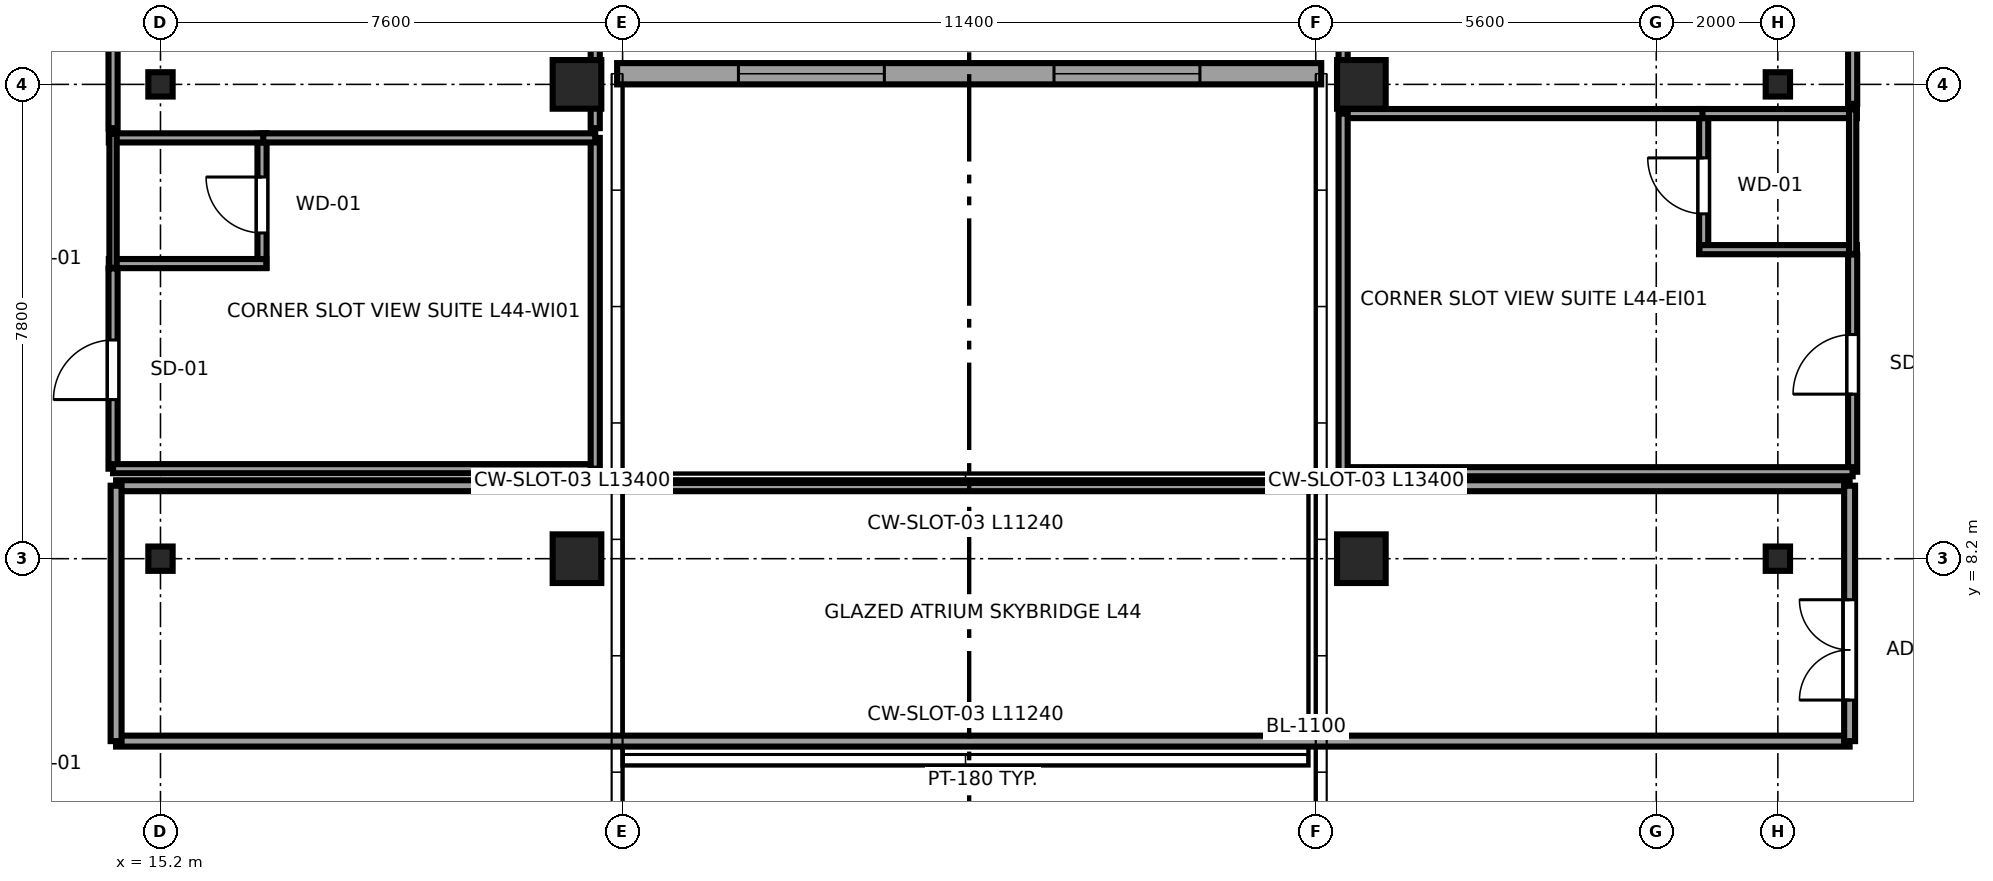
"""IFC4 building model, lengths in metres.
Left out: names, types, materials, properties, quantities, classifications, styles, units other than length and angle.
Written with IfcOpenShell. Run it as: python <this file> out.ifc"""

import sys

from ifc_helpers import new_model, si_unit, direction, frame, frame_2d, origin, origin_2d, place, context, subcontext, project, spatial, rectangle, i_section, extrude, source, transform, mapped, element, fill, save


model = new_model("IFC4")
c1 = context("Model", 3, precision=1e-05, world=origin(), true_north=direction((0.0, 1.0)))
c2 = subcontext(c1, "Body", "Model", "MODEL_VIEW")
j1 = project(units=[si_unit("LENGTHUNIT", "METRE"), si_unit("PLANEANGLEUNIT", "RADIAN")], contexts=[c1])
p1 = place(None, origin())
s1 = spatial("IfcSite", under=j1, at=p1, CompositionType="ELEMENT")
p2 = place(p1, origin())
s2 = spatial("IfcBuilding", under=s1, at=p2, CompositionType="ELEMENT")
p3 = place(p2, frame((0.0, 0.0, 168.35)))
s3 = spatial("IfcBuildingStorey", under=s2, at=p3, CompositionType="ELEMENT", Elevation=168.35)
m1 = source(origin(), c2, "Body", "SweptSolid", [
    extrude(i_section(OverallWidth=0.4, OverallDepth=0.4, WebThickness=0.02, FlangeThickness=0.035, at=origin_2d()), origin(), (0.0, 0.0, 1.0), 3.55),
])
for number, where, z_axis, x_axis in (
    (1, (15.2, 8.2, 0.0), (0.0, 0.0, 1.0), (1.0, 0.0, 0.0)),
    (2, (15.2, 16.0, 0.0), (0.0, 0.0, 1.0), (1.0, 0.0, 0.0)),
):
    element("IfcColumn", number, at=place(p3, frame(where, z_axis=z_axis, x_axis=x_axis)), inside=s3, PredefinedType="COLUMN", context=c2, shape_type="MappedRepresentation", body=[
        mapped(m1, transform((0.0, 0.0, 0.0), x_axis=(1.0, 0.0, 0.0), y_axis=(0.0, 1.0, 0.0), z_axis=(0.0, 0.0, 1.0), scale=1.0)),
    ])
m2 = source(origin(), c2, "Body", "SweptSolid", [
    extrude(rectangle(XDim=0.8, YDim=0.8, at=origin_2d()), origin(), (0.0, 0.0, 1.0), 3.55),
])
for number, where, z_axis, x_axis in (
    (3, (22.05, 8.2, 0.0), (0.0, 0.0, 1.0), (1.0, 0.0, 0.0)),
    (4, (22.05, 16.0, 0.0), (0.0, 0.0, 1.0), (1.0, 0.0, 0.0)),
    (5, (34.95, 8.2, 0.0), (0.0, 0.0, 1.0), (1.0, 0.0, 0.0)),
    (6, (34.95, 16.0, 0.0), (0.0, 0.0, 1.0), (1.0, 0.0, 0.0)),
):
    element("IfcColumn", number, at=place(p3, frame(where, z_axis=z_axis, x_axis=x_axis)), inside=s3, PredefinedType="COLUMN", context=c2, shape_type="MappedRepresentation", body=[
        mapped(m2, transform((0.0, 0.0, 0.0), x_axis=(1.0, 0.0, 0.0), y_axis=(0.0, 1.0, 0.0), z_axis=(0.0, 0.0, 1.0), scale=1.0)),
    ])
for number, where, z_axis, x_axis in (
    (7, (41.8, 8.2, 0.0), (0.0, 0.0, 1.0), (1.0, 0.0, 0.0)),
    (8, (41.8, 16.0, 0.0), (0.0, 0.0, 1.0), (1.0, 0.0, 0.0)),
):
    element("IfcColumn", number, at=place(p3, frame(where, z_axis=z_axis, x_axis=x_axis)), inside=s3, PredefinedType="COLUMN", context=c2, shape_type="MappedRepresentation", body=[
        mapped(m1, transform((0.0, 0.0, 0.0), x_axis=(1.0, 0.0, 0.0), y_axis=(0.0, 1.0, 0.0), z_axis=(0.0, 0.0, 1.0), scale=1.0)),
    ])
p4 = place(p3, frame((22.71, 16.175, 0.0), z_axis=(0.0, 0.0, 1.0), x_axis=(1.0, 0.0, 0.0)))
e9 = element("IfcWall", 9, at=p4, inside=s3, PredefinedType="SOLIDWALL", context=c2, shape_type="SweptSolid", body=[
    extrude(rectangle(XDim=11.58, YDim=0.35, at=frame_2d((5.79, 0.0))), origin(), (0.0, 0.0, 1.0), 2.758),
])
p5 = place(p4, frame((1.995, 0.0, 0.68)))
e10 = element("IfcOpeningElement", 10, at=p5, cuts=e9, PredefinedType="OPENING", context=c2, shape_type="SweptSolid", body=[
    extrude(rectangle(XDim=2.4, YDim=1.9, at=frame_2d((1.2, 0.95))), frame((0.0, 0.185, 0.0), z_axis=(0.0, -1.0, 0.0), x_axis=(1.0, 0.0, 0.0)), (0.0, 0.0, 1.0), 0.37),
])
p6 = place(p4, frame((7.185, 0.0, 0.68)))
e11 = element("IfcOpeningElement", 11, at=p6, cuts=e9, PredefinedType="OPENING", context=c2, shape_type="SweptSolid", body=[
    extrude(rectangle(XDim=2.4, YDim=1.9, at=frame_2d((1.2, 0.95))), frame((0.0, 0.185, 0.0), z_axis=(0.0, -1.0, 0.0), x_axis=(1.0, 0.0, 0.0)), (0.0, 0.0, 1.0), 0.37),
])
p7 = place(p3, frame((16.87, 12.983, 0.0), z_axis=(0.0, 0.0, 1.0), x_axis=(0.0, 1.0, 0.0)))
e12 = element("IfcWall", 12, at=p7, inside=s3, PredefinedType="PARTITIONING", context=c2, shape_type="SweptSolid", body=[
    extrude(rectangle(XDim=2.207, YDim=0.15, at=frame_2d((1.104, 0.0))), origin(), (0.0, 0.0, 1.0), 3.37),
])
p8 = place(p7, frame((0.573, 0.0, 0.0)))
e13 = element("IfcOpeningElement", 13, at=p8, cuts=e12, PredefinedType="OPENING", context=c2, shape_type="SweptSolid", body=[
    extrude(rectangle(XDim=0.92, YDim=2.01, at=frame_2d((0.46, 1.005))), frame((0.0, 0.085, 0.0), z_axis=(0.0, -1.0, 0.0), x_axis=(1.0, 0.0, 0.0)), (0.0, 0.0, 1.0), 0.17),
])
for number, where, z_axis, x_axis in (
    (14, (14.35, 13.053, 0.0), (0.0, 0.0, 1.0), (1.0, 0.0, 0.0)),
    (15, (14.35, 15.12, 0.0), (0.0, 0.0, 1.0), (1.0, 0.0, 0.0)),
):
    element("IfcWall", number, at=place(p3, frame(where, z_axis=z_axis, x_axis=x_axis)), inside=s3, PredefinedType="PARTITIONING", context=c2, shape_type="SweptSolid", body=[
        extrude(rectangle(XDim=2.59, YDim=0.15, at=frame_2d((1.295, 0.0))), origin(), (0.0, 0.0, 1.0), 3.37),
    ])
p9 = place(p3, frame((14.42, 12.983, 0.0), z_axis=(0.0, 0.0, 1.0), x_axis=(0.0, 1.0, 0.0)))
e16 = element("IfcWall", 16, at=p9, inside=s3, PredefinedType="PLUMBINGWALL", context=c2, shape_type="SweptSolid", body=[
    extrude(rectangle(XDim=2.207, YDim=0.12, at=frame_2d((1.104, 0.0))), origin(), (0.0, 0.0, 1.0), 3.37),
])
p10 = place(p3, frame((40.58, 13.212, 0.0), z_axis=(0.0, 0.0, 1.0), x_axis=(0.0, 1.0, 0.0)))
e17 = element("IfcWall", 17, at=p10, inside=s3, PredefinedType="PARTITIONING", context=c2, shape_type="SweptSolid", body=[
    extrude(rectangle(XDim=2.378, YDim=0.15, at=frame_2d((1.189, 0.0))), origin(), (0.0, 0.0, 1.0), 3.37),
])
p11 = place(p10, frame((0.659, 0.0, 0.0)))
e18 = element("IfcOpeningElement", 18, at=p11, cuts=e17, PredefinedType="OPENING", context=c2, shape_type="SweptSolid", body=[
    extrude(rectangle(XDim=0.92, YDim=2.01, at=frame_2d((0.46, 1.005))), frame((0.0, 0.085, 0.0), z_axis=(0.0, -1.0, 0.0), x_axis=(1.0, 0.0, 0.0)), (0.0, 0.0, 1.0), 0.17),
])
for number, where, z_axis, x_axis in (
    (19, (40.51, 13.282, 0.0), (0.0, 0.0, 1.0), (1.0, 0.0, 0.0)),
    (20, (40.51, 15.52, 0.0), (0.0, 0.0, 1.0), (1.0, 0.0, 0.0)),
):
    element("IfcWall", number, at=place(p3, frame(where, z_axis=z_axis, x_axis=x_axis)), inside=s3, PredefinedType="PARTITIONING", context=c2, shape_type="SweptSolid", body=[
        extrude(rectangle(XDim=2.59, YDim=0.15, at=frame_2d((1.295, 0.0))), origin(), (0.0, 0.0, 1.0), 3.37),
    ])
p12 = place(p3, frame((43.03, 13.212, 0.0), z_axis=(0.0, 0.0, 1.0), x_axis=(0.0, 1.0, 0.0)))
e21 = element("IfcWall", 21, at=p12, inside=s3, PredefinedType="PLUMBINGWALL", context=c2, shape_type="SweptSolid", body=[
    extrude(rectangle(XDim=2.378, YDim=0.12, at=frame_2d((1.189, 0.0))), origin(), (0.0, 0.0, 1.0), 3.37),
])
p13 = place(p3, frame((14.42, 9.68, 0.0), z_axis=(0.0, 0.0, 1.0), x_axis=(0.0, 1.0, 0.0)))
e22 = element("IfcWall", 22, at=p13, inside=s3, PredefinedType="PARTITIONING", context=c2, shape_type="SweptSolid", body=[
    extrude(rectangle(XDim=3.293, YDim=0.15, at=frame_2d((1.646, 0.0))), origin(), (0.0, 0.0, 1.0), 3.37),
])
p14 = place(p13, frame((1.136, 0.0, 0.0)))
e23 = element("IfcOpeningElement", 23, at=p14, cuts=e22, PredefinedType="OPENING", context=c2, shape_type="SweptSolid", body=[
    extrude(rectangle(XDim=0.98, YDim=2.12, at=frame_2d((0.49, 1.06))), frame((0.0, 0.085, 0.0), z_axis=(0.0, -1.0, 0.0), x_axis=(1.0, 0.0, 0.0)), (0.0, 0.0, 1.0), 0.17),
])
p15 = place(p3, frame((14.42, 9.68, 0.0), z_axis=(0.0, 0.0, 1.0), x_axis=(1.0, 0.0, 0.0)))
e24 = element("IfcWall", 24, at=p15, inside=s3, PredefinedType="PARTITIONING", context=c2, shape_type="SweptSolid", body=[
    extrude(rectangle(XDim=7.93, YDim=0.15, at=frame_2d((3.965, 0.0))), origin(), (0.0, 0.0, 1.0), 2.748),
])
p16 = place(p3, frame((22.35, 9.68, 0.0), z_axis=(0.0, 0.0, 1.0), x_axis=(0.0, 1.0, 0.0)))
e25 = element("IfcWall", 25, at=p16, inside=s3, PredefinedType="PARTITIONING", context=c2, shape_type="SweptSolid", body=[
    extrude(rectangle(XDim=5.44, YDim=0.15, at=frame_2d((2.72, 0.0))), origin(), (0.0, 0.0, 1.0), 3.37),
])
p17 = place(p3, frame((16.89, 15.12, 0.0), z_axis=(0.0, 0.0, 1.0), x_axis=(1.0, 0.0, 0.0)))
e26 = element("IfcWall", 26, at=p17, inside=s3, PredefinedType="PARTITIONING", context=c2, shape_type="SweptSolid", body=[
    extrude(rectangle(XDim=5.46, YDim=0.15, at=frame_2d((2.73, 0.0))), origin(), (0.0, 0.0, 1.0), 3.37),
])
p18 = place(p3, frame((14.42, 15.28, 0.0), z_axis=(0.0, 0.0, 1.0), x_axis=(0.0, 1.0, 0.0)))
e27 = element("IfcWall", 27, at=p18, inside=s3, PredefinedType="PARTITIONING", context=c2, shape_type="SweptSolid", body=[
    extrude(rectangle(XDim=3.355, YDim=0.15, at=frame_2d((1.677, 0.0))), origin(), (0.0, 0.0, 1.0), 3.37),
])
p19 = place(p18, frame((2.065, 0.0, 0.0)))
e28 = element("IfcOpeningElement", 28, at=p19, cuts=e27, PredefinedType="OPENING", context=c2, shape_type="SweptSolid", body=[
    extrude(rectangle(XDim=0.98, YDim=2.12, at=frame_2d((0.49, 1.06))), frame((0.0, 0.085, 0.0), z_axis=(0.0, -1.0, 0.0), x_axis=(1.0, 0.0, 0.0)), (0.0, 0.0, 1.0), 0.17),
])
p20 = place(p3, frame((22.35, 15.28, 0.0), z_axis=(0.0, 0.0, 1.0), x_axis=(0.0, 1.0, 0.0)))
e29 = element("IfcWall", 29, at=p20, inside=s3, PredefinedType="PARTITIONING", context=c2, shape_type="SweptSolid", body=[
    extrude(rectangle(XDim=5.54, YDim=0.15, at=frame_2d((2.77, 0.0))), origin(), (0.0, 0.0, 1.0), 3.37),
])
p21 = place(p3, frame((43.03, 9.63, 0.0), z_axis=(0.0, 0.0, 1.0), x_axis=(0.0, 1.0, 0.0)))
e30 = element("IfcWall", 30, at=p21, inside=s3, PredefinedType="PARTITIONING", context=c2, shape_type="SweptSolid", body=[
    extrude(rectangle(XDim=3.572, YDim=0.15, at=frame_2d((1.786, 0.0))), origin(), (0.0, 0.0, 1.0), 3.37),
])
p22 = place(p21, frame((1.276, 0.0, 0.0)))
e31 = element("IfcOpeningElement", 31, at=p22, cuts=e30, PredefinedType="OPENING", context=c2, shape_type="SweptSolid", body=[
    extrude(rectangle(XDim=0.98, YDim=2.12, at=frame_2d((0.49, 1.06))), frame((0.0, 0.085, 0.0), z_axis=(0.0, -1.0, 0.0), x_axis=(1.0, 0.0, 0.0)), (0.0, 0.0, 1.0), 0.17),
])
p23 = place(p3, frame((34.65, 9.63, 0.0), z_axis=(0.0, 0.0, 1.0), x_axis=(1.0, 0.0, 0.0)))
e32 = element("IfcWall", 32, at=p23, inside=s3, PredefinedType="PARTITIONING", context=c2, shape_type="SweptSolid", body=[
    extrude(rectangle(XDim=8.38, YDim=0.15, at=frame_2d((4.19, 0.0))), origin(), (0.0, 0.0, 1.0), 2.748),
])
p24 = place(p3, frame((34.65, 15.52, 0.0), z_axis=(0.0, 0.0, 1.0), x_axis=(1.0, 0.0, 0.0)))
e33 = element("IfcWall", 33, at=p24, inside=s3, PredefinedType="PARTITIONING", context=c2, shape_type="SweptSolid", body=[
    extrude(rectangle(XDim=5.91, YDim=0.15, at=frame_2d((2.955, 0.0))), origin(), (0.0, 0.0, 1.0), 3.37),
])
p25 = place(p3, frame((34.65, 9.63, 0.0), z_axis=(0.0, 0.0, 1.0), x_axis=(0.0, 1.0, 0.0)))
e34 = element("IfcWall", 34, at=p25, inside=s3, PredefinedType="PARTITIONING", context=c2, shape_type="SweptSolid", body=[
    extrude(rectangle(XDim=5.89, YDim=0.15, at=frame_2d((2.945, 0.0))), origin(), (0.0, 0.0, 1.0), 3.37),
])
p26 = place(p3, frame((43.03, 15.68, 0.0), z_axis=(0.0, 0.0, 1.0), x_axis=(0.0, 1.0, 0.0)))
e35 = element("IfcWall", 35, at=p26, inside=s3, PredefinedType="PARTITIONING", context=c2, shape_type="SweptSolid", body=[
    extrude(rectangle(XDim=3.107, YDim=0.15, at=frame_2d((1.554, 0.0))), origin(), (0.0, 0.0, 1.0), 3.37),
])
p27 = place(p26, frame((1.043, 0.0, 0.0)))
e36 = element("IfcOpeningElement", 36, at=p27, cuts=e35, PredefinedType="OPENING", context=c2, shape_type="SweptSolid", body=[
    extrude(rectangle(XDim=0.98, YDim=2.12, at=frame_2d((0.49, 1.06))), frame((0.0, 0.085, 0.0), z_axis=(0.0, -1.0, 0.0), x_axis=(1.0, 0.0, 0.0)), (0.0, 0.0, 1.0), 0.17),
])
p28 = place(p3, frame((34.65, 15.68, 0.0), z_axis=(0.0, 0.0, 1.0), x_axis=(0.0, 1.0, 0.0)))
e37 = element("IfcWall", 37, at=p28, inside=s3, PredefinedType="PARTITIONING", context=c2, shape_type="SweptSolid", body=[
    extrude(rectangle(XDim=5.14, YDim=0.15, at=frame_2d((2.57, 0.0))), origin(), (0.0, 0.0, 1.0), 3.37),
])
for number, where, z_axis, x_axis in (
    (38, (14.47, 5.2, 0.0), (0.0, 0.0, 1.0), (1.0, 0.0, 0.0)),
    (39, (14.47, 9.4, 0.0), (0.0, 0.0, 1.0), (1.0, 0.0, 0.0)),
):
    element("IfcWall", number, at=place(p3, frame(where, z_axis=z_axis, x_axis=x_axis)), inside=s3, PredefinedType="PARTITIONING", context=c2, shape_type="SweptSolid", body=[
        extrude(rectangle(XDim=28.51, YDim=0.18, at=frame_2d((14.255, 0.0))), origin(), (0.0, 0.0, 1.0), 3.37),
    ])
p29 = place(p3, frame((14.47, 5.2, 0.0), z_axis=(0.0, 0.0, 1.0), x_axis=(0.0, 1.0, 0.0)))
e40 = element("IfcWall", 40, at=p29, inside=s3, PredefinedType="PARTITIONING", context=c2, shape_type="SweptSolid", body=[
    extrude(rectangle(XDim=4.2, YDim=0.18, at=frame_2d((2.1, 0.0))), origin(), (0.0, 0.0, 1.0), 3.37),
])
p30 = place(p3, frame((42.98, 5.2, 0.0), z_axis=(0.0, 0.0, 1.0), x_axis=(0.0, 1.0, 0.0)))
e41 = element("IfcWall", 41, at=p30, inside=s3, PredefinedType="PARTITIONING", context=c2, shape_type="SweptSolid", body=[
    extrude(rectangle(XDim=4.2, YDim=0.18, at=frame_2d((2.1, 0.0))), origin(), (0.0, 0.0, 1.0), 3.37),
])
p31 = place(p30, frame((0.675, 0.0, 0.0)))
e42 = element("IfcOpeningElement", 42, at=p31, cuts=e41, PredefinedType="OPENING", context=c2, shape_type="SweptSolid", body=[
    extrude(rectangle(XDim=1.65, YDim=2.15, at=frame_2d((0.825, 1.075))), frame((0.0, 0.1, 0.0), z_axis=(0.0, -1.0, 0.0), x_axis=(1.0, 0.0, 0.0)), (0.0, 0.0, 1.0), 0.2),
])
m3 = source(origin(), c2, "Body", "SweptSolid", [
    extrude(rectangle(XDim=2.4, YDim=1.9, at=frame_2d((1.2, 0.95))), frame((0.0, 0.09, 0.0), z_axis=(0.0, -1.0, 0.0), x_axis=(1.0, 0.0, 0.0)), (0.0, 0.0, 1.0), 0.06),
])
p32 = place(p5, origin())
e43 = element("IfcWindow", 43, at=p32, inside=s3, PartitioningType="TRIPLE_PANEL_HORIZONTAL", PredefinedType="WINDOW", context=c2, shape_type="MappedRepresentation", body=[
    mapped(m3, transform((0.0, 0.0, 0.0), x_axis=(1.0, 0.0, 0.0), y_axis=(0.0, 1.0, 0.0), z_axis=(0.0, 0.0, 1.0), scale=1.0)),
])
fill(e10, e43)
p33 = place(p6, origin())
e44 = element("IfcWindow", 44, at=p33, inside=s3, PartitioningType="TRIPLE_PANEL_HORIZONTAL", PredefinedType="WINDOW", context=c2, shape_type="MappedRepresentation", body=[
    mapped(m3, transform((0.0, 0.0, 0.0), x_axis=(1.0, 0.0, 0.0), y_axis=(0.0, 1.0, 0.0), z_axis=(0.0, 0.0, 1.0), scale=1.0)),
])
fill(e11, e44)
m4 = source(origin(), c2, "Body", "SweptSolid", [
    extrude(rectangle(XDim=0.92, YDim=2.01, at=frame_2d((0.46, 1.005))), frame((0.0, 0.025, 0.0), z_axis=(0.0, -1.0, 0.0), x_axis=(1.0, 0.0, 0.0)), (0.0, 0.0, 1.0), 0.05),
])
p34 = place(p8, origin())
e45 = element("IfcDoor", 45, at=p34, inside=s3, OperationType="SINGLE_SWING_RIGHT", PredefinedType="DOOR", context=c2, shape_type="MappedRepresentation", body=[
    mapped(m4, transform((0.0, 0.0, 0.0), x_axis=(1.0, 0.0, 0.0), y_axis=(0.0, 1.0, 0.0), z_axis=(0.0, 0.0, 1.0), scale=1.0)),
])
fill(e13, e45)
p35 = place(p11, origin())
e46 = element("IfcDoor", 46, at=p35, inside=s3, OperationType="SINGLE_SWING_RIGHT", PredefinedType="DOOR", context=c2, shape_type="MappedRepresentation", body=[
    mapped(m4, transform((0.0, 0.0, 0.0), x_axis=(1.0, 0.0, 0.0), y_axis=(0.0, 1.0, 0.0), z_axis=(0.0, 0.0, 1.0), scale=1.0)),
])
fill(e18, e46)
m5 = source(origin(), c2, "Body", "SweptSolid", [
    extrude(rectangle(XDim=0.98, YDim=2.12, at=frame_2d((0.49, 1.06))), frame((0.0, 0.025, 0.0), z_axis=(0.0, -1.0, 0.0), x_axis=(1.0, 0.0, 0.0)), (0.0, 0.0, 1.0), 0.05),
])
p36 = place(p14, origin())
e47 = element("IfcDoor", 47, at=p36, inside=s3, OperationType="SINGLE_SWING_LEFT", PredefinedType="DOOR", context=c2, shape_type="MappedRepresentation", body=[
    mapped(m5, transform((0.0, 0.0, 0.0), x_axis=(1.0, 0.0, 0.0), y_axis=(0.0, 1.0, 0.0), z_axis=(0.0, 0.0, 1.0), scale=1.0)),
])
fill(e23, e47)
p37 = place(p22, origin())
e48 = element("IfcDoor", 48, at=p37, inside=s3, OperationType="SINGLE_SWING_LEFT", PredefinedType="DOOR", context=c2, shape_type="MappedRepresentation", body=[
    mapped(m5, transform((0.0, 0.0, 0.0), x_axis=(1.0, 0.0, 0.0), y_axis=(0.0, 1.0, 0.0), z_axis=(0.0, 0.0, 1.0), scale=1.0)),
])
fill(e31, e48)
m6 = source(origin(), c2, "Body", "SweptSolid", [
    extrude(rectangle(XDim=1.65, YDim=2.15, at=frame_2d((0.825, 1.075))), frame((0.0, 0.025, 0.0), z_axis=(0.0, -1.0, 0.0), x_axis=(1.0, 0.0, 0.0)), (0.0, 0.0, 1.0), 0.05),
])
p38 = place(p31, origin())
e49 = element("IfcDoor", 49, at=p38, inside=s3, OperationType="DOUBLE_DOOR_SINGLE_SWING", PredefinedType="DOOR", context=c2, shape_type="MappedRepresentation", body=[
    mapped(m6, transform((0.0, 0.0, 0.0), x_axis=(1.0, 0.0, 0.0), y_axis=(0.0, 1.0, 0.0), z_axis=(0.0, 0.0, 1.0), scale=1.0)),
])
fill(e42, e49)
save(model, sys.argv[1])
